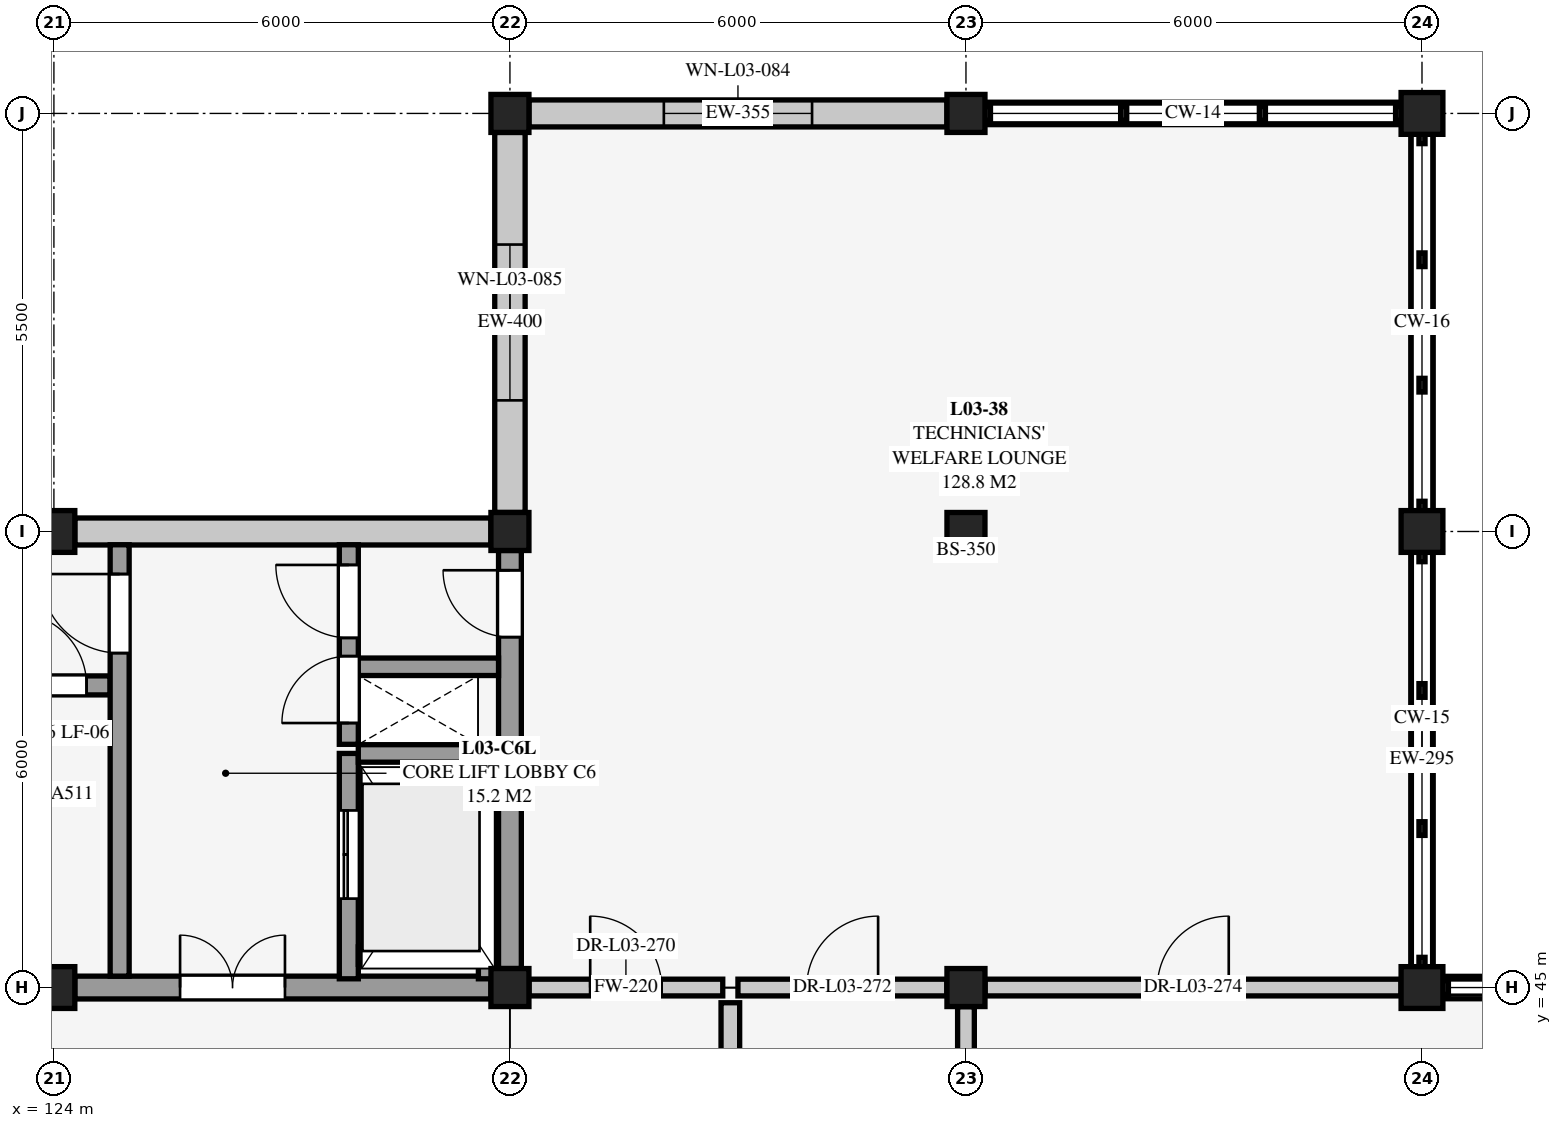
"""IFC4 building model, lengths in metres.
Left out: names, types, materials, properties, quantities, classifications, styles, units other than length and angle.
Written with IfcOpenShell. Run it as: python <this file> out.ifc"""

import sys

from ifc_helpers import new_model, si_unit, direction, frame, frame_2d, origin, origin_2d, place, context, subcontext, project, spatial, rectangle, extrude, element, fill, save


model = new_model("IFC4")
c1 = context("Model", 3, precision=1e-05, world=origin(), true_north=direction((0.0, 1.0)))
c2 = subcontext(c1, "Body", "Model", "MODEL_VIEW")
j1 = project(units=[si_unit("LENGTHUNIT", "METRE"), si_unit("PLANEANGLEUNIT", "RADIAN")], contexts=[c1])
p1 = place(None, origin())
s1 = spatial("IfcSite", under=j1, at=p1, CompositionType="ELEMENT")
p2 = place(p1, origin())
s2 = spatial("IfcBuilding", under=s1, at=p2, CompositionType="ELEMENT")
p3 = place(p2, frame((0.0, 0.0, 9.0)))
s3 = spatial("IfcBuildingStorey", under=s2, at=p3, CompositionType="ELEMENT", Elevation=9.0)
for number, where, z_axis, x_axis in (
    (1, (124.0, 45.0, 0.0), (0.0, 0.0, 1.0), (1.0, 0.0, 0.0)),
    (2, (124.0, 51.0, 0.0), (0.0, 0.0, 1.0), (1.0, 0.0, 0.0)),
):
    element("IfcColumn", number, at=place(p3, frame(where, z_axis=z_axis, x_axis=x_axis)), inside=s3, PredefinedType="COLUMN", context=c2, shape_type="SweptSolid", body=[
        extrude(rectangle(XDim=0.55, YDim=0.55, at=origin_2d()), origin(), (0.0, 0.0, 1.0), 4.5),
    ])
for number, where, z_axis, x_axis in (
    (3, (130.0, 45.0, 0.0), (0.0, 0.0, 1.0), (1.0, 0.0, 0.0)),
    (4, (130.0, 51.0, 0.0), (0.0, 0.0, 1.0), (1.0, 0.0, 0.0)),
    (5, (130.0, 56.5, 0.0), (0.0, 0.0, 1.0), (1.0, 0.0, 0.0)),
    (6, (136.0, 45.0, 0.0), (0.0, 0.0, 1.0), (1.0, 0.0, 0.0)),
    (7, (136.0, 51.0, 0.0), (0.0, 0.0, 1.0), (1.0, 0.0, 0.0)),
    (8, (136.0, 56.5, 0.0), (0.0, 0.0, 1.0), (1.0, 0.0, 0.0)),
):
    element("IfcColumn", number, at=place(p3, frame(where, z_axis=z_axis, x_axis=x_axis)), inside=s3, PredefinedType="COLUMN", context=c2, shape_type="SweptSolid", body=[
        extrude(rectangle(XDim=0.5, YDim=0.5, at=origin_2d()), origin(), (0.0, 0.0, 1.0), 4.5),
    ])
for number, where, z_axis, x_axis in (
    (9, (142.0, 45.0, 0.0), (0.0, 0.0, 1.0), (1.0, 0.0, 0.0)),
    (10, (142.0, 51.0, 0.0), (0.0, 0.0, 1.0), (1.0, 0.0, 0.0)),
    (11, (142.0, 56.5, 0.0), (0.0, 0.0, 1.0), (1.0, 0.0, 0.0)),
):
    element("IfcColumn", number, at=place(p3, frame(where, z_axis=z_axis, x_axis=x_axis)), inside=s3, PredefinedType="COLUMN", context=c2, shape_type="SweptSolid", body=[
        extrude(rectangle(XDim=0.55, YDim=0.55, at=origin_2d()), origin(), (0.0, 0.0, 1.0), 4.5),
    ])
p4 = place(p3, frame((142.275, 45.0, 0.0), z_axis=(0.0, 0.0, 1.0), x_axis=(1.0, 0.0, 0.0)))
e12 = element("IfcWall", 12, at=p4, inside=s3, PredefinedType="SOLIDWALL", context=c2, shape_type="SweptSolid", body=[
    extrude(rectangle(XDim=5.425, YDim=0.295, at=frame_2d((2.712, 0.0))), origin(), (0.0, 0.0, 1.0), 0.41),
])
p5 = place(p3, frame((124.275, 51.0, 0.0), z_axis=(0.0, 0.0, 1.0), x_axis=(1.0, 0.0, 0.0)))
e13 = element("IfcWall", 13, at=p5, inside=s3, PredefinedType="SOLIDWALL", context=c2, shape_type="SweptSolid", body=[
    extrude(rectangle(XDim=5.475, YDim=0.355, at=frame_2d((2.738, 0.0))), origin(), (0.0, 0.0, 1.0), 3.857),
])
p6 = place(p3, frame((130.25, 56.5, 0.0), z_axis=(0.0, 0.0, 1.0), x_axis=(1.0, 0.0, 0.0)))
e14 = element("IfcWall", 14, at=p6, inside=s3, PredefinedType="SOLIDWALL", context=c2, shape_type="SweptSolid", body=[
    extrude(rectangle(XDim=5.5, YDim=0.355, at=frame_2d((2.75, 0.0))), origin(), (0.0, 0.0, 1.0), 3.869),
])
p7 = place(p6, frame((1.775, 0.0, 0.7)))
e15 = element("IfcOpeningElement", 15, at=p7, cuts=e14, PredefinedType="OPENING", context=c2, shape_type="SweptSolid", body=[
    extrude(rectangle(XDim=1.95, YDim=2.35, at=frame_2d((0.975, 1.175))), frame((0.0, 0.188, 0.0), z_axis=(0.0, -1.0, 0.0), x_axis=(1.0, 0.0, 0.0)), (0.0, 0.0, 1.0), 0.375),
])
p8 = place(p3, frame((136.25, 56.5, 0.0), z_axis=(0.0, 0.0, 1.0), x_axis=(1.0, 0.0, 0.0)))
e16 = element("IfcWall", 16, at=p8, inside=s3, PredefinedType="SOLIDWALL", context=c2, shape_type="SweptSolid", body=[
    extrude(rectangle(XDim=5.475, YDim=0.295, at=frame_2d((2.738, 0.0))), origin(), (0.0, 0.0, 1.0), 0.41),
])
p9 = place(p3, frame((142.0, 50.725, 0.0), z_axis=(0.0, 0.0, 1.0), x_axis=(0.0, -1.0, 0.0)))
e17 = element("IfcWall", 17, at=p9, inside=s3, PredefinedType="SOLIDWALL", context=c2, shape_type="SweptSolid", body=[
    extrude(rectangle(XDim=5.45, YDim=0.295, at=frame_2d((2.725, 0.0))), origin(), (0.0, 0.0, 1.0), 0.46),
])
p10 = place(p3, frame((130.0, 51.25, 0.0), z_axis=(0.0, 0.0, 1.0), x_axis=(0.0, 1.0, 0.0)))
e18 = element("IfcWall", 18, at=p10, inside=s3, PredefinedType="SOLIDWALL", context=c2, shape_type="SweptSolid", body=[
    extrude(rectangle(XDim=5.0, YDim=0.4, at=frame_2d((2.5, 0.0))), origin(), (0.0, 0.0, 1.0), 3.857),
])
p11 = place(p10, frame((1.475, 0.0, 0.7)))
e19 = element("IfcOpeningElement", 19, at=p11, cuts=e18, PredefinedType="OPENING", context=c2, shape_type="SweptSolid", body=[
    extrude(rectangle(XDim=2.05, YDim=2.4, at=frame_2d((1.025, 1.2))), frame((0.0, 0.21, 0.0), z_axis=(0.0, -1.0, 0.0), x_axis=(1.0, 0.0, 0.0)), (0.0, 0.0, 1.0), 0.42),
])
p12 = place(p3, frame((142.0, 56.225, 0.0), z_axis=(0.0, 0.0, 1.0), x_axis=(0.0, -1.0, 0.0)))
e20 = element("IfcWall", 20, at=p12, inside=s3, PredefinedType="SOLIDWALL", context=c2, shape_type="SweptSolid", body=[
    extrude(rectangle(XDim=4.95, YDim=0.295, at=frame_2d((2.475, 0.0))), origin(), (0.0, 0.0, 1.0), 0.52),
])
p13 = place(p3, frame((124.275, 45.0, 0.0), z_axis=(0.0, 0.0, 1.0), x_axis=(1.0, 0.0, 0.0)))
e21 = element("IfcWall", 21, at=p13, inside=s3, PredefinedType="SHEAR", context=c2, shape_type="SweptSolid", body=[
    extrude(rectangle(XDim=5.475, YDim=0.3, at=frame_2d((2.738, 0.0))), origin(), (0.0, 0.0, 1.0), 4.264),
])
p14 = place(p13, frame((1.385, 0.0, 0.0)))
e22 = element("IfcOpeningElement", 22, at=p14, cuts=e21, PredefinedType="OPENING", context=c2, shape_type="SweptSolid", body=[
    extrude(rectangle(XDim=1.38, YDim=2.16, at=frame_2d((0.69, 1.08))), frame((0.0, 0.16, 0.0), z_axis=(0.0, -1.0, 0.0), x_axis=(1.0, 0.0, 0.0)), (0.0, 0.0, 1.0), 0.32),
])
p15 = place(p3, frame((130.0, 45.25, 0.0), z_axis=(0.0, 0.0, 1.0), x_axis=(0.0, 1.0, 0.0)))
e23 = element("IfcWall", 23, at=p15, inside=s3, PredefinedType="SHEAR", context=c2, shape_type="SweptSolid", body=[
    extrude(rectangle(XDim=5.5, YDim=0.3, at=frame_2d((2.75, 0.0))), origin(), (0.0, 0.0, 1.0), 4.264),
])
p16 = place(p15, frame((4.36, 0.0, 0.0)))
e24 = element("IfcOpeningElement", 24, at=p16, cuts=e23, PredefinedType="OPENING", context=c2, shape_type="SweptSolid", body=[
    extrude(rectangle(XDim=0.88, YDim=2.08, at=frame_2d((0.44, 1.04))), frame((0.0, 0.16, 0.0), z_axis=(0.0, -1.0, 0.0), x_axis=(1.0, 0.0, 0.0)), (0.0, 0.0, 1.0), 0.32),
])
p17 = place(p3, frame((123.16, 48.975, 0.0), z_axis=(0.0, 0.0, 1.0), x_axis=(1.0, 0.0, 0.0)))
e25 = element("IfcWall", 25, at=p17, inside=s3, PredefinedType="SHEAR", context=c2, shape_type="SweptSolid", body=[
    extrude(rectangle(XDim=1.58, YDim=0.25, at=frame_2d((0.79, 0.0))), origin(), (0.0, 0.0, 1.0), 4.264),
])
p18 = place(p17, frame((0.31, 0.0, 0.0)))
e26 = element("IfcOpeningElement", 26, at=p18, cuts=e25, PredefinedType="OPENING", context=c2, shape_type="SweptSolid", body=[
    extrude(rectangle(XDim=0.96, YDim=2.12, at=frame_2d((0.48, 1.06))), frame((0.0, 0.135, 0.0), z_axis=(0.0, -1.0, 0.0), x_axis=(1.0, 0.0, 0.0)), (0.0, 0.0, 1.0), 0.27),
])
p19 = place(p3, frame((124.865, 45.15, 0.0), z_axis=(0.0, 0.0, 1.0), x_axis=(0.0, 1.0, 0.0)))
e27 = element("IfcWall", 27, at=p19, inside=s3, PredefinedType="SHEAR", context=c2, shape_type="SweptSolid", body=[
    extrude(rectangle(XDim=5.675, YDim=0.25, at=frame_2d((2.837, 0.0))), origin(), (0.0, 0.0, 1.0), 4.264),
])
p20 = place(p19, frame((4.25, 0.0, 0.0)))
e28 = element("IfcOpeningElement", 28, at=p20, cuts=e27, PredefinedType="OPENING", context=c2, shape_type="SweptSolid", body=[
    extrude(rectangle(XDim=1.04, YDim=2.14, at=frame_2d((0.52, 1.07))), frame((0.0, 0.135, 0.0), z_axis=(0.0, -1.0, 0.0), x_axis=(1.0, 0.0, 0.0)), (0.0, 0.0, 1.0), 0.27),
])
p21 = place(p3, frame((127.88, 45.115, 0.0), z_axis=(0.0, 0.0, 1.0), x_axis=(0.0, 1.0, 0.0)))
e29 = element("IfcWall", 29, at=p21, inside=s3, PredefinedType="SHEAR", context=c2, shape_type="SweptSolid", body=[
    extrude(rectangle(XDim=2.965, YDim=0.25, at=frame_2d((1.482, 0.0))), origin(), (0.0, 0.0, 1.0), 4.5),
])
p22 = place(p21, frame((1.055, 0.0, 0.0)))
e30 = element("IfcOpeningElement", 30, at=p22, cuts=e29, PredefinedType="OPENING", context=c2, shape_type="SweptSolid", body=[
    extrude(rectangle(XDim=1.16, YDim=2.18, at=frame_2d((0.58, 1.09))), frame((0.0, 0.135, 0.0), z_axis=(0.0, -1.0, 0.0), x_axis=(1.0, 0.0, 0.0)), (0.0, 0.0, 1.0), 0.27),
])
p23 = place(p3, frame((128.005, 45.42, 0.0), z_axis=(0.0, 0.0, 1.0), x_axis=(1.0, 0.0, 0.0)))
e31 = element("IfcWall", 31, at=p23, inside=s3, PredefinedType="SHEAR", context=c2, shape_type="SweptSolid", body=[
    extrude(rectangle(XDim=1.58, YDim=0.23, at=frame_2d((0.79, 0.0))), origin(), (0.0, 0.0, 1.0), 4.5),
])
p24 = place(p3, frame((129.7, 45.115, 0.0), z_axis=(0.0, 0.0, 1.0), x_axis=(0.0, 1.0, 0.0)))
e32 = element("IfcWall", 32, at=p24, inside=s3, PredefinedType="SHEAR", context=c2, shape_type="SweptSolid", body=[
    extrude(rectangle(XDim=2.965, YDim=0.23, at=frame_2d((1.482, 0.0))), origin(), (0.0, 0.0, 1.0), 4.5),
])
p25 = place(p3, frame((128.005, 48.08, 0.0), z_axis=(0.0, 0.0, 1.0), x_axis=(1.0, 0.0, 0.0)))
e33 = element("IfcWall", 33, at=p25, inside=s3, PredefinedType="SHEAR", context=c2, shape_type="SweptSolid", body=[
    extrude(rectangle(XDim=1.58, YDim=0.23, at=frame_2d((0.79, 0.0))), origin(), (0.0, 0.0, 1.0), 4.5),
])
p26 = place(p3, frame((127.88, 48.2, 0.0), z_axis=(0.0, 0.0, 1.0), x_axis=(0.0, 1.0, 0.0)))
e34 = element("IfcWall", 34, at=p26, inside=s3, PredefinedType="SHEAR", context=c2, shape_type="SweptSolid", body=[
    extrude(rectangle(XDim=2.625, YDim=0.25, at=frame_2d((1.312, 0.0))), origin(), (0.0, 0.0, 1.0), 4.264),
])
p27 = place(p26, frame((0.28, 0.0, 0.0)))
e35 = element("IfcOpeningElement", 35, at=p27, cuts=e34, PredefinedType="OPENING", context=c2, shape_type="SweptSolid", body=[
    extrude(rectangle(XDim=0.88, YDim=2.08, at=frame_2d((0.44, 1.04))), frame((0.0, 0.135, 0.0), z_axis=(0.0, -1.0, 0.0), x_axis=(1.0, 0.0, 0.0)), (0.0, 0.0, 1.0), 0.27),
])
p28 = place(p26, frame((1.4, 0.0, 0.0)))
e36 = element("IfcOpeningElement", 36, at=p28, cuts=e34, PredefinedType="OPENING", context=c2, shape_type="SweptSolid", body=[
    extrude(rectangle(XDim=0.96, YDim=2.12, at=frame_2d((0.48, 1.06))), frame((0.0, 0.135, 0.0), z_axis=(0.0, -1.0, 0.0), x_axis=(1.0, 0.0, 0.0)), (0.0, 0.0, 1.0), 0.27),
])
p29 = place(p3, frame((128.005, 49.22, 0.0), z_axis=(0.0, 0.0, 1.0), x_axis=(1.0, 0.0, 0.0)))
e37 = element("IfcWall", 37, at=p29, inside=s3, PredefinedType="SHEAR", context=c2, shape_type="SweptSolid", body=[
    extrude(rectangle(XDim=1.845, YDim=0.23, at=frame_2d((0.923, 0.0))), origin(), (0.0, 0.0, 1.0), 4.264),
])
p30 = place(p3, frame((132.9, 33.085, 0.0), z_axis=(0.0, 0.0, 1.0), x_axis=(0.0, 1.0, 0.0)))
e38 = element("IfcWall", 38, at=p30, inside=s3, PredefinedType="PARTITIONING", context=c2, shape_type="SweptSolid", body=[
    extrude(rectangle(XDim=11.715, YDim=0.245, at=frame_2d((5.857, 0.0))), origin(), (0.0, 0.0, 1.0), 4.3),
])
p31 = place(p30, frame((5.067, 0.0, 0.0)))
e39 = element("IfcOpeningElement", 39, at=p31, cuts=e38, PredefinedType="OPENING", context=c2, shape_type="SweptSolid", body=[
    extrude(rectangle(XDim=1.58, YDim=2.2, at=frame_2d((0.79, 1.1))), frame((0.0, 0.133, 0.0), z_axis=(0.0, -1.0, 0.0), x_axis=(1.0, 0.0, 0.0)), (0.0, 0.0, 1.0), 0.265),
])
p32 = place(p3, frame((130.252, 45.0, 0.0), z_axis=(0.0, 0.0, 1.0), x_axis=(1.0, 0.0, 0.0)))
e40 = element("IfcWall", 40, at=p32, inside=s3, PredefinedType="SOLIDWALL", context=c2, shape_type="SweptSolid", body=[
    extrude(rectangle(XDim=2.548, YDim=0.22, at=frame_2d((1.274, 0.0))), origin(), (0.0, 0.0, 1.0), 3.647),
])
p33 = place(p32, frame((0.804, 0.0, 0.0)))
e41 = element("IfcOpeningElement", 41, at=p33, cuts=e40, PredefinedType="OPENING", context=c2, shape_type="SweptSolid", body=[
    extrude(rectangle(XDim=0.94, YDim=2.1, at=frame_2d((0.47, 1.05))), frame((0.0, 0.12, 0.0), z_axis=(0.0, -1.0, 0.0), x_axis=(1.0, 0.0, 0.0)), (0.0, 0.0, 1.0), 0.24),
])
p34 = place(p3, frame((136.0, 39.327, 0.0), z_axis=(0.0, 0.0, 1.0), x_axis=(0.0, 1.0, 0.0)))
e42 = element("IfcWall", 42, at=p34, inside=s3, PredefinedType="SOLIDWALL", context=c2, shape_type="SweptSolid", body=[
    extrude(rectangle(XDim=5.421, YDim=0.22, at=frame_2d((2.71, 0.0))), origin(), (0.0, 0.0, 1.0), 3.819),
])
p35 = place(p34, frame((1.92, 0.0, 0.0)))
e43 = element("IfcOpeningElement", 43, at=p35, cuts=e42, PredefinedType="OPENING", context=c2, shape_type="SweptSolid", body=[
    extrude(rectangle(XDim=1.58, YDim=2.2, at=frame_2d((0.79, 1.1))), frame((0.0, 0.12, 0.0), z_axis=(0.0, -1.0, 0.0), x_axis=(1.0, 0.0, 0.0)), (0.0, 0.0, 1.0), 0.24),
])
p36 = place(p3, frame((133.0, 45.0, 0.0), z_axis=(0.0, 0.0, 1.0), x_axis=(1.0, 0.0, 0.0)))
e44 = element("IfcWall", 44, at=p36, inside=s3, PredefinedType="SOLIDWALL", context=c2, shape_type="SweptSolid", body=[
    extrude(rectangle(XDim=2.748, YDim=0.22, at=frame_2d((1.374, 0.0))), origin(), (0.0, 0.0, 1.0), 3.647),
])
p37 = place(p36, frame((0.904, 0.0, 0.0)))
e45 = element("IfcOpeningElement", 45, at=p37, cuts=e44, PredefinedType="OPENING", context=c2, shape_type="SweptSolid", body=[
    extrude(rectangle(XDim=0.94, YDim=2.1, at=frame_2d((0.47, 1.05))), frame((0.0, 0.12, 0.0), z_axis=(0.0, -1.0, 0.0), x_axis=(1.0, 0.0, 0.0)), (0.0, 0.0, 1.0), 0.24),
])
p38 = place(p3, frame((136.252, 45.0, 0.0), z_axis=(0.0, 0.0, 1.0), x_axis=(1.0, 0.0, 0.0)))
e46 = element("IfcWall", 46, at=p38, inside=s3, PredefinedType="SOLIDWALL", context=c2, shape_type="SweptSolid", body=[
    extrude(rectangle(XDim=5.471, YDim=0.22, at=frame_2d((2.735, 0.0))), origin(), (0.0, 0.0, 1.0), 3.659),
])
p39 = place(p38, frame((2.265, 0.0, 0.0)))
e47 = element("IfcOpeningElement", 47, at=p39, cuts=e46, PredefinedType="OPENING", context=c2, shape_type="SweptSolid", body=[
    extrude(rectangle(XDim=0.94, YDim=2.1, at=frame_2d((0.47, 1.05))), frame((0.0, 0.12, 0.0), z_axis=(0.0, -1.0, 0.0), x_axis=(1.0, 0.0, 0.0)), (0.0, 0.0, 1.0), 0.24),
])
p40 = place(p7, origin())
e48 = element("IfcWindow", 48, at=p40, inside=s3, PartitioningType="SINGLE_PANEL", PredefinedType="WINDOW", context=c2, shape_type="SweptSolid", body=[
    extrude(rectangle(XDim=1.95, YDim=2.35, at=frame_2d((0.975, 1.175))), frame((0.0, 0.03, 0.0), z_axis=(0.0, -1.0, 0.0), x_axis=(1.0, 0.0, 0.0)), (0.0, 0.0, 1.0), 0.06),
])
fill(e15, e48)
p41 = place(p11, origin())
e49 = element("IfcWindow", 49, at=p41, inside=s3, PartitioningType="SINGLE_PANEL", PredefinedType="WINDOW", context=c2, shape_type="SweptSolid", body=[
    extrude(rectangle(XDim=2.05, YDim=2.4, at=frame_2d((1.025, 1.2))), frame((0.0, 0.03, 0.0), z_axis=(0.0, -1.0, 0.0), x_axis=(1.0, 0.0, 0.0)), (0.0, 0.0, 1.0), 0.06),
])
fill(e19, e49)
p42 = place(p14, origin())
e50 = element("IfcDoor", 50, at=p42, inside=s3, OperationType="DOUBLE_DOOR_SINGLE_SWING", PredefinedType="DOOR", context=c2, shape_type="SweptSolid", body=[
    extrude(rectangle(XDim=1.38, YDim=2.16, at=frame_2d((0.69, 1.08))), frame((0.0, 0.025, 0.0), z_axis=(0.0, -1.0, 0.0), x_axis=(1.0, 0.0, 0.0)), (0.0, 0.0, 1.0), 0.05),
])
fill(e22, e50)
p43 = place(p16, origin())
e51 = element("IfcDoor", 51, at=p43, inside=s3, OperationType="SINGLE_SWING_RIGHT", PredefinedType="DOOR", context=c2, shape_type="SweptSolid", body=[
    extrude(rectangle(XDim=0.88, YDim=2.08, at=frame_2d((0.44, 1.04))), frame((0.0, 0.025, 0.0), z_axis=(0.0, -1.0, 0.0), x_axis=(1.0, 0.0, 0.0)), (0.0, 0.0, 1.0), 0.05),
])
fill(e24, e51)
p44 = place(p18, origin())
e52 = element("IfcDoor", 52, at=p44, inside=s3, OperationType="SINGLE_SWING_LEFT", PredefinedType="DOOR", context=c2, shape_type="SweptSolid", body=[
    extrude(rectangle(XDim=0.96, YDim=2.12, at=frame_2d((0.48, 1.06))), frame((0.0, 0.025, 0.0), z_axis=(0.0, -1.0, 0.0), x_axis=(1.0, 0.0, 0.0)), (0.0, 0.0, 1.0), 0.05),
])
fill(e26, e52)
p45 = place(p20, origin())
e53 = element("IfcDoor", 53, at=p45, inside=s3, OperationType="SINGLE_SWING_RIGHT", PredefinedType="DOOR", context=c2, shape_type="SweptSolid", body=[
    extrude(rectangle(XDim=1.04, YDim=2.14, at=frame_2d((0.52, 1.07))), frame((0.0, 0.025, 0.0), z_axis=(0.0, -1.0, 0.0), x_axis=(1.0, 0.0, 0.0)), (0.0, 0.0, 1.0), 0.05),
])
fill(e28, e53)
p46 = place(p22, origin())
e54 = element("IfcDoor", 54, at=p46, inside=s3, OperationType="DOUBLE_DOOR_SLIDING", PredefinedType="DOOR", context=c2, shape_type="SweptSolid", body=[
    extrude(rectangle(XDim=1.16, YDim=2.18, at=frame_2d((0.58, 1.09))), frame((0.0, 0.025, 0.0), z_axis=(0.0, -1.0, 0.0), x_axis=(1.0, 0.0, 0.0)), (0.0, 0.0, 1.0), 0.05),
])
fill(e30, e54)
p47 = place(p27, origin())
e55 = element("IfcDoor", 55, at=p47, inside=s3, OperationType="SINGLE_SWING_LEFT", PredefinedType="DOOR", context=c2, shape_type="SweptSolid", body=[
    extrude(rectangle(XDim=0.88, YDim=2.08, at=frame_2d((0.44, 1.04))), frame((0.0, 0.025, 0.0), z_axis=(0.0, -1.0, 0.0), x_axis=(1.0, 0.0, 0.0)), (0.0, 0.0, 1.0), 0.05),
])
fill(e35, e55)
p48 = place(p28, origin())
e56 = element("IfcDoor", 56, at=p48, inside=s3, OperationType="SINGLE_SWING_RIGHT", PredefinedType="DOOR", context=c2, shape_type="SweptSolid", body=[
    extrude(rectangle(XDim=0.96, YDim=2.12, at=frame_2d((0.48, 1.06))), frame((0.0, 0.025, 0.0), z_axis=(0.0, -1.0, 0.0), x_axis=(1.0, 0.0, 0.0)), (0.0, 0.0, 1.0), 0.05),
])
fill(e36, e56)
p49 = place(p33, origin())
e57 = element("IfcDoor", 57, at=p49, inside=s3, OperationType="SINGLE_SWING_LEFT", PredefinedType="DOOR", context=c2, shape_type="SweptSolid", body=[
    extrude(rectangle(XDim=0.94, YDim=2.1, at=frame_2d((0.47, 1.05))), frame((0.0, 0.025, 0.0), z_axis=(0.0, -1.0, 0.0), x_axis=(1.0, 0.0, 0.0)), (0.0, 0.0, 1.0), 0.05),
])
fill(e41, e57)
p50 = place(p37, origin())
e58 = element("IfcDoor", 58, at=p50, inside=s3, OperationType="SINGLE_SWING_RIGHT", PredefinedType="DOOR", context=c2, shape_type="SweptSolid", body=[
    extrude(rectangle(XDim=0.94, YDim=2.1, at=frame_2d((0.47, 1.05))), frame((0.0, 0.025, 0.0), z_axis=(0.0, -1.0, 0.0), x_axis=(1.0, 0.0, 0.0)), (0.0, 0.0, 1.0), 0.05),
])
fill(e45, e58)
p51 = place(p39, origin())
e59 = element("IfcDoor", 59, at=p51, inside=s3, OperationType="SINGLE_SWING_RIGHT", PredefinedType="DOOR", context=c2, shape_type="SweptSolid", body=[
    extrude(rectangle(XDim=0.94, YDim=2.1, at=frame_2d((0.47, 1.05))), frame((0.0, 0.025, 0.0), z_axis=(0.0, -1.0, 0.0), x_axis=(1.0, 0.0, 0.0)), (0.0, 0.0, 1.0), 0.05),
])
fill(e47, e59)
save(model, sys.argv[1])
